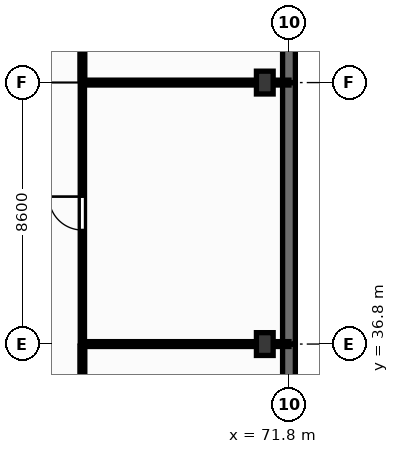
"""IFC4 building model, lengths in metres.
Left out: names, types, materials, properties, quantities, classifications, styles, units other than length and angle.
Written with IfcOpenShell. Run it as: python <this file> out.ifc"""

import sys

from ifc_helpers import new_model, si_unit, direction, frame, frame_2d, origin, origin_2d, place, context, subcontext, project, spatial, rectangle, extrude, element, fill, save


model = new_model("IFC4")
c1 = context("Model", 3, precision=1e-05, world=origin(), true_north=direction((0.0, 1.0)))
c2 = subcontext(c1, "Body", "Model", "MODEL_VIEW")
j1 = project(units=[si_unit("LENGTHUNIT", "METRE"), si_unit("PLANEANGLEUNIT", "RADIAN")], contexts=[c1])
p1 = place(None, origin())
s1 = spatial("IfcSite", under=j1, at=p1, CompositionType="ELEMENT")
p2 = place(p1, origin())
s2 = spatial("IfcBuilding", under=s1, at=p2, CompositionType="ELEMENT")
p3 = place(p2, frame((0.0, 0.0, -4.5)))
s3 = spatial("IfcBuildingStorey", under=s2, at=p3, CompositionType="ELEMENT", Elevation=-4.5)
for number, where, z_axis, x_axis in (
    (1, (71.0, 36.8, 0.0), (0.0, 0.0, 1.0), (1.0, 0.0, 0.0)),
    (2, (71.0, 45.4, 0.0), (0.0, 0.0, 1.0), (1.0, 0.0, 0.0)),
):
    element("IfcColumn", number, at=place(p3, frame(where, z_axis=z_axis, x_axis=x_axis)), inside=s3, PredefinedType="COLUMN", context=c2, shape_type="SweptSolid", body=[
        extrude(rectangle(XDim=0.55, YDim=0.75, at=origin_2d()), origin(), (0.0, 0.0, 1.0), 4.2),
    ])
p4 = place(p3, frame((71.795, 27.2, 0.0), z_axis=(0.0, 0.0, 1.0), x_axis=(0.0, 1.0, 0.0)))
e3 = element("IfcWall", 3, at=p4, inside=s3, PredefinedType="USERDEFINED", context=c2, shape_type="SweptSolid", body=[
    extrude(rectangle(XDim=9.6, YDim=0.42, at=frame_2d((4.8, 0.0))), origin(), (0.0, 0.0, 1.0), 4.2),
])
p5 = place(p3, frame((71.795, 36.8, 0.0), z_axis=(0.0, 0.0, 1.0), x_axis=(0.0, 1.0, 0.0)))
e4 = element("IfcWall", 4, at=p5, inside=s3, PredefinedType="USERDEFINED", context=c2, shape_type="SweptSolid", body=[
    extrude(rectangle(XDim=8.6, YDim=0.42, at=frame_2d((4.3, 0.0))), origin(), (0.0, 0.0, 1.0), 4.2),
])
p6 = place(p3, frame((71.795, 45.4, 0.0), z_axis=(0.0, 0.0, 1.0), x_axis=(0.0, 1.0, 0.0)))
e5 = element("IfcWall", 5, at=p6, inside=s3, PredefinedType="USERDEFINED", context=c2, shape_type="SweptSolid", body=[
    extrude(rectangle(XDim=7.2, YDim=0.42, at=frame_2d((3.6, 0.0))), origin(), (0.0, 0.0, 1.0), 4.2),
])
p7 = place(p3, frame((65.0, 33.47, 0.0), z_axis=(0.0, 0.0, 1.0), x_axis=(0.0, 1.0, 0.0)))
e6 = element("IfcWall", 6, at=p7, inside=s3, PredefinedType="PARTITIONING", context=c2, shape_type="SweptSolid", body=[
    extrude(rectangle(XDim=3.26, YDim=0.16, at=frame_2d((1.63, 0.0))), origin(), (0.0, 0.0, 1.0), 4.08),
])
p8 = place(p7, frame((1.15, 0.0, 0.0)))
e7 = element("IfcOpeningElement", 7, at=p8, cuts=e6, PredefinedType="OPENING", context=c2, shape_type="SweptSolid", body=[
    extrude(rectangle(XDim=0.96, YDim=2.1, at=frame_2d((0.48, 1.05))), frame((0.0, 0.09, 0.0), z_axis=(0.0, -1.0, 0.0), x_axis=(1.0, 0.0, 0.0)), (0.0, 0.0, 1.0), 0.18),
])
p9 = place(p3, frame((65.0, 36.87, 0.0), z_axis=(0.0, 0.0, 1.0), x_axis=(0.0, 1.0, 0.0)))
e8 = element("IfcWall", 8, at=p9, inside=s3, PredefinedType="PARTITIONING", context=c2, shape_type="SweptSolid", body=[
    extrude(rectangle(XDim=8.46, YDim=0.14, at=frame_2d((4.23, 0.0))), origin(), (0.0, 0.0, 1.0), 4.08),
])
p10 = place(p9, frame((3.68, 0.0, 0.0)))
e9 = element("IfcOpeningElement", 9, at=p10, cuts=e8, PredefinedType="OPENING", context=c2, shape_type="SweptSolid", body=[
    extrude(rectangle(XDim=1.1, YDim=2.1, at=frame_2d((0.55, 1.05))), frame((0.0, 0.08, 0.0), z_axis=(0.0, -1.0, 0.0), x_axis=(1.0, 0.0, 0.0)), (0.0, 0.0, 1.0), 0.16),
])
p11 = place(p3, frame((65.0, 36.8, 0.0), z_axis=(0.0, 0.0, 1.0), x_axis=(1.0, 0.0, 0.0)))
e10 = element("IfcWall", 10, at=p11, inside=s3, PredefinedType="PARTITIONING", context=c2, shape_type="SweptSolid", body=[
    extrude(rectangle(XDim=5.725, YDim=0.16, at=frame_2d((2.863, 0.0))), origin(), (0.0, 0.0, 1.0), 3.4),
])
p12 = place(p3, frame((71.275, 36.8, 0.0), z_axis=(0.0, 0.0, 1.0), x_axis=(1.0, 0.0, 0.0)))
e11 = element("IfcWall", 11, at=p12, inside=s3, PredefinedType="PARTITIONING", context=c2, shape_type="SweptSolid", body=[
    extrude(rectangle(XDim=0.52, YDim=0.16, at=frame_2d((0.26, 0.0))), origin(), (0.0, 0.0, 1.0), 4.08),
])
p13 = place(p3, frame((65.0, 45.47, 0.0), z_axis=(0.0, 0.0, 1.0), x_axis=(0.0, 1.0, 0.0)))
e12 = element("IfcWall", 12, at=p13, inside=s3, PredefinedType="PARTITIONING", context=c2, shape_type="SweptSolid", body=[
    extrude(rectangle(XDim=5.06, YDim=0.16, at=frame_2d((2.53, 0.0))), origin(), (0.0, 0.0, 1.0), 4.08),
])
p14 = place(p13, frame((2.05, 0.0, 0.0)))
e13 = element("IfcOpeningElement", 13, at=p14, cuts=e12, PredefinedType="OPENING", context=c2, shape_type="SweptSolid", body=[
    extrude(rectangle(XDim=0.96, YDim=2.1, at=frame_2d((0.48, 1.05))), frame((0.0, 0.09, 0.0), z_axis=(0.0, -1.0, 0.0), x_axis=(1.0, 0.0, 0.0)), (0.0, 0.0, 1.0), 0.18),
])
p15 = place(p3, frame((65.0, 45.4, 0.0), z_axis=(0.0, 0.0, 1.0), x_axis=(1.0, 0.0, 0.0)))
e14 = element("IfcWall", 14, at=p15, inside=s3, PredefinedType="PARTITIONING", context=c2, shape_type="SweptSolid", body=[
    extrude(rectangle(XDim=5.725, YDim=0.16, at=frame_2d((2.863, 0.0))), origin(), (0.0, 0.0, 1.0), 3.4),
])
p16 = place(p3, frame((71.275, 45.4, 0.0), z_axis=(0.0, 0.0, 1.0), x_axis=(1.0, 0.0, 0.0)))
e15 = element("IfcWall", 15, at=p16, inside=s3, PredefinedType="PARTITIONING", context=c2, shape_type="SweptSolid", body=[
    extrude(rectangle(XDim=0.52, YDim=0.16, at=frame_2d((0.26, 0.0))), origin(), (0.0, 0.0, 1.0), 4.08),
])
p17 = place(p10, origin())
e16 = element("IfcDoor", 16, at=p17, inside=s3, OperationType="SINGLE_SWING_RIGHT", PredefinedType="DOOR", context=c2, shape_type="SweptSolid", body=[
    extrude(rectangle(XDim=1.1, YDim=2.1, at=frame_2d((0.55, 1.05))), frame((0.0, 0.025, 0.0), z_axis=(0.0, -1.0, 0.0), x_axis=(1.0, 0.0, 0.0)), (0.0, 0.0, 1.0), 0.05),
])
fill(e9, e16)
save(model, sys.argv[1])
